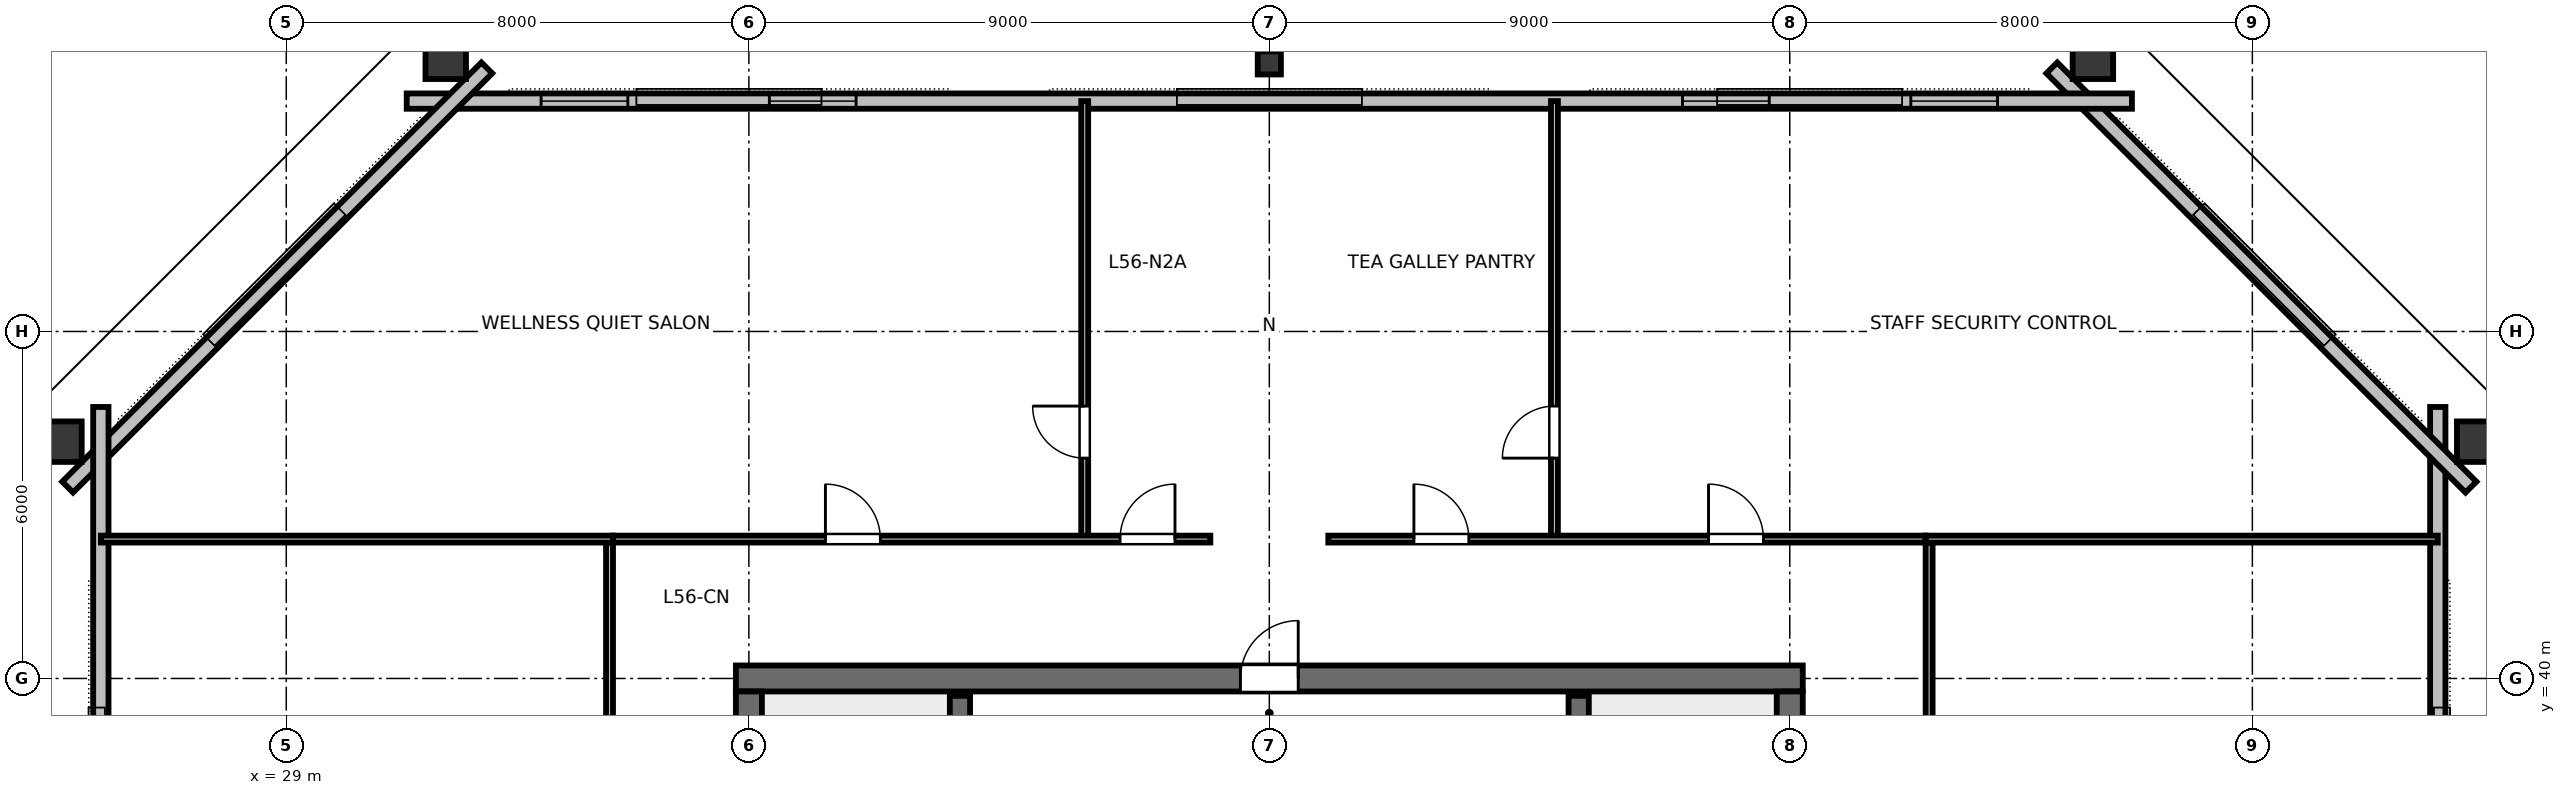
"""IFC4 building model, lengths in metres.
Left out: names, types, materials, properties, quantities, classifications, styles, units other than length and angle.
Written with IfcOpenShell. Run it as: python <this file> out.ifc"""

import sys

from ifc_helpers import new_model, si_unit, direction, frame, frame_2d, origin, origin_2d, place, context, subcontext, project, spatial, rectangle, hollow_rectangle, i_section, extrude, element, fill, save


model = new_model("IFC4")
c1 = context("Model", 3, precision=1e-05, world=origin(), true_north=direction((0.0, 1.0)))
c2 = subcontext(c1, "Body", "Model", "MODEL_VIEW")
j1 = project(units=[si_unit("LENGTHUNIT", "METRE"), si_unit("PLANEANGLEUNIT", "RADIAN")], contexts=[c1])
p1 = place(None, origin())
s1 = spatial("IfcSite", under=j1, at=p1, CompositionType="ELEMENT")
p2 = place(p1, origin())
s2 = spatial("IfcBuilding", under=s1, at=p2, CompositionType="ELEMENT")
p3 = place(p2, frame((0.0, 0.0, 213.0)))
s3 = spatial("IfcBuildingStorey", under=s2, at=p3, CompositionType="ELEMENT", Elevation=213.0)
p4 = place(p3, frame((36.775, 40.0, 0.0), z_axis=(0.0, 0.0, 1.0), x_axis=(1.0, 0.0, 0.0)))
e1 = element("IfcWall", 1, at=p4, inside=s3, PredefinedType="SHEAR", context=c2, shape_type="SweptSolid", body=[
    extrude(rectangle(XDim=18.45, YDim=0.45, at=frame_2d((9.225, 0.0))), origin(), (0.0, 0.0, 1.0), 3.36),
])
p5 = place(p4, frame((8.725, 0.0, 0.0)))
e2 = element("IfcOpeningElement", 2, at=p5, cuts=e1, PredefinedType="OPENING", context=c2, shape_type="SweptSolid", body=[
    extrude(rectangle(XDim=1.0, YDim=2.15, at=frame_2d((0.5, 1.075))), frame((0.0, 0.235, 0.0), z_axis=(0.0, -1.0, 0.0), x_axis=(1.0, 0.0, 0.0)), (0.0, 0.0, 1.0), 0.47),
])
p6 = place(p3, frame((37.0, 24.225, 0.0), z_axis=(0.0, 0.0, 1.0), x_axis=(0.0, 1.0, 0.0)))
e3 = element("IfcWall", 3, at=p6, inside=s3, PredefinedType="SHEAR", context=c2, shape_type="SweptSolid", body=[
    extrude(rectangle(XDim=15.55, YDim=0.45, at=frame_2d((7.775, 0.0))), origin(), (0.0, 0.0, 1.0), 3.36),
])
p7 = place(p6, frame((5.3, 0.0, 0.0)))
e4 = element("IfcOpeningElement", 4, at=p7, cuts=e3, PredefinedType="OPENING", context=c2, shape_type="SweptSolid", body=[
    extrude(rectangle(XDim=1.15, YDim=2.15, at=frame_2d((0.575, 1.075))), frame((0.0, 0.235, 0.0), z_axis=(0.0, -1.0, 0.0), x_axis=(1.0, 0.0, 0.0)), (0.0, 0.0, 1.0), 0.47),
])
p8 = place(p3, frame((55.0, 24.225, 0.0), z_axis=(0.0, 0.0, 1.0), x_axis=(0.0, 1.0, 0.0)))
e5 = element("IfcWall", 5, at=p8, inside=s3, PredefinedType="SHEAR", context=c2, shape_type="SweptSolid", body=[
    extrude(rectangle(XDim=15.55, YDim=0.45, at=frame_2d((7.775, 0.0))), origin(), (0.0, 0.0, 1.0), 3.36),
])
p9 = place(p8, frame((5.3, 0.0, 0.0)))
e6 = element("IfcOpeningElement", 6, at=p9, cuts=e5, PredefinedType="OPENING", context=c2, shape_type="SweptSolid", body=[
    extrude(rectangle(XDim=1.15, YDim=2.15, at=frame_2d((0.575, 1.075))), frame((0.0, 0.235, 0.0), z_axis=(0.0, -1.0, 0.0), x_axis=(1.0, 0.0, 0.0)), (0.0, 0.0, 1.0), 0.47),
])
for number, where, z_axis, x_axis in (
    (7, (66.963, 44.095, 0.0), (0.0, 0.0, 1.0), (0.0, 1.0, 0.0)),
    (8, (60.242, 50.79, 0.0), (0.0, 0.0, 1.0), (1.0, 0.0, 0.0)),
):
    element("IfcColumn", number, at=place(p3, frame(where, z_axis=z_axis, x_axis=x_axis)), inside=s3, PredefinedType="COLUMN", context=c2, shape_type="SweptSolid", body=[
        extrude(hollow_rectangle(XDim=0.7, YDim=0.85, WallThickness=0.04, at=origin_2d()), origin(), (0.0, 0.0, 1.0), 3.373),
    ])
p10 = place(p3, frame((46.0, 50.644, 0.0), z_axis=(0.0, 0.0, 1.0), x_axis=(1.0, 0.0, 0.0)))
e9 = element("IfcColumn", 9, at=p10, inside=s3, PredefinedType="COLUMN", context=c2, shape_type="SweptSolid", body=[
    extrude(i_section(OverallWidth=0.401, OverallDepth=0.399, WebThickness=0.025, FlangeThickness=0.04, FilletRadius=0.025, at=origin_2d()), origin(), (0.0, 0.0, 1.0), 3.373),
])
for number, where, z_axis, x_axis in (
    (10, (31.758, 50.79, 0.0), (0.0, 0.0, 1.0), (1.0, 0.0, 0.0)),
    (11, (25.037, 44.095, 0.0), (0.0, 0.0, 1.0), (0.0, 1.0, 0.0)),
):
    element("IfcColumn", number, at=place(p3, frame(where, z_axis=z_axis, x_axis=x_axis)), inside=s3, PredefinedType="COLUMN", context=c2, shape_type="SweptSolid", body=[
        extrude(hollow_rectangle(XDim=0.7, YDim=0.85, WallThickness=0.04, at=origin_2d()), origin(), (0.0, 0.0, 1.0), 3.373),
    ])
p11 = place(p3, frame((66.206, 19.305, 0.0), z_axis=(0.0, 0.0, 1.0), x_axis=(0.0, 1.0, 0.0)))
e12 = element("IfcWall", 12, at=p11, inside=s3, PredefinedType="STANDARD", context=c2, shape_type="SweptSolid", body=[
    extrude(rectangle(XDim=25.389, YDim=0.265, at=frame_2d((12.695, 0.0))), origin(), (0.0, 0.0, 1.0), 3.375),
])
p12 = place(p11, frame((6.147, 0.0, 0.85)))
e13 = element("IfcOpeningElement", 13, at=p12, cuts=e12, PredefinedType="OPENING", context=c2, shape_type="SweptSolid", body=[
    extrude(rectangle(XDim=1.5, YDim=1.85, at=frame_2d((0.75, 0.925))), frame((0.0, 0.142, 0.0), z_axis=(0.0, -1.0, 0.0), x_axis=(1.0, 0.0, 0.0)), (0.0, 0.0, 1.0), 0.285),
])
p13 = place(p11, frame((17.742, 0.0, 0.85)))
e14 = element("IfcOpeningElement", 14, at=p13, cuts=e12, PredefinedType="OPENING", context=c2, shape_type="SweptSolid", body=[
    extrude(rectangle(XDim=1.5, YDim=1.85, at=frame_2d((0.75, 0.925))), frame((0.0, 0.142, 0.0), z_axis=(0.0, -1.0, 0.0), x_axis=(1.0, 0.0, 0.0)), (0.0, 0.0, 1.0), 0.285),
])
p14 = place(p3, frame((66.78, 43.309, 0.0), z_axis=(0.0, 0.0, 1.0), x_axis=(-0.707106781187, 0.707106781187, 0.0)))
e15 = element("IfcWall", 15, at=p14, inside=s3, PredefinedType="STANDARD", context=c2, shape_type="SweptSolid", body=[
    extrude(rectangle(XDim=10.251, YDim=0.265, at=frame_2d((5.125, 0.0))), origin(), (0.0, 0.0, 1.0), 3.375),
])
p15 = place(p3, frame((60.917, 49.984, 0.0), z_axis=(0.0, 0.0, 1.0), x_axis=(-1.0, 0.0, 0.0)))
e16 = element("IfcWall", 16, at=p15, inside=s3, PredefinedType="STANDARD", context=c2, shape_type="SweptSolid", body=[
    extrude(rectangle(XDim=29.834, YDim=0.265, at=frame_2d((14.917, 0.0))), origin(), (0.0, 0.0, 1.0), 3.375),
])
p16 = place(p15, frame((2.324, 0.0, 0.85)))
e17 = element("IfcOpeningElement", 17, at=p16, cuts=e16, PredefinedType="OPENING", context=c2, shape_type="SweptSolid", body=[
    extrude(rectangle(XDim=1.5, YDim=1.85, at=frame_2d((0.75, 0.925))), frame((0.0, 0.142, 0.0), z_axis=(0.0, -1.0, 0.0), x_axis=(1.0, 0.0, 0.0)), (0.0, 0.0, 1.0), 0.285),
])
p17 = place(p15, frame((6.272, 0.0, 0.85)))
e18 = element("IfcOpeningElement", 18, at=p17, cuts=e16, PredefinedType="OPENING", context=c2, shape_type="SweptSolid", body=[
    extrude(rectangle(XDim=1.5, YDim=1.85, at=frame_2d((0.75, 0.925))), frame((0.0, 0.142, 0.0), z_axis=(0.0, -1.0, 0.0), x_axis=(1.0, 0.0, 0.0)), (0.0, 0.0, 1.0), 0.285),
])
p18 = place(p15, frame((22.063, 0.0, 0.85)))
e19 = element("IfcOpeningElement", 19, at=p18, cuts=e16, PredefinedType="OPENING", context=c2, shape_type="SweptSolid", body=[
    extrude(rectangle(XDim=1.5, YDim=1.85, at=frame_2d((0.75, 0.925))), frame((0.0, 0.142, 0.0), z_axis=(0.0, -1.0, 0.0), x_axis=(1.0, 0.0, 0.0)), (0.0, 0.0, 1.0), 0.285),
])
p19 = place(p15, frame((26.011, 0.0, 0.85)))
e20 = element("IfcOpeningElement", 20, at=p19, cuts=e16, PredefinedType="OPENING", context=c2, shape_type="SweptSolid", body=[
    extrude(rectangle(XDim=1.5, YDim=1.85, at=frame_2d((0.75, 0.925))), frame((0.0, 0.142, 0.0), z_axis=(0.0, -1.0, 0.0), x_axis=(1.0, 0.0, 0.0)), (0.0, 0.0, 1.0), 0.285),
])
p20 = place(p3, frame((32.468, 50.558, 0.0), z_axis=(0.0, 0.0, 1.0), x_axis=(-0.707106781187, -0.707106781187, 0.0)))
e21 = element("IfcWall", 21, at=p20, inside=s3, PredefinedType="STANDARD", context=c2, shape_type="SweptSolid", body=[
    extrude(rectangle(XDim=10.251, YDim=0.265, at=frame_2d((5.125, 0.0))), origin(), (0.0, 0.0, 1.0), 3.375),
])
p21 = place(p3, frame((25.794, 44.695, 0.0), z_axis=(0.0, 0.0, 1.0), x_axis=(0.0, -1.0, 0.0)))
e22 = element("IfcWall", 22, at=p21, inside=s3, PredefinedType="STANDARD", context=c2, shape_type="SweptSolid", body=[
    extrude(rectangle(XDim=25.389, YDim=0.265, at=frame_2d((12.695, 0.0))), origin(), (0.0, 0.0, 1.0), 3.375),
])
p22 = place(p21, frame((6.147, 0.0, 0.85)))
e23 = element("IfcOpeningElement", 23, at=p22, cuts=e22, PredefinedType="OPENING", context=c2, shape_type="SweptSolid", body=[
    extrude(rectangle(XDim=1.5, YDim=1.85, at=frame_2d((0.75, 0.925))), frame((0.0, 0.142, 0.0), z_axis=(0.0, -1.0, 0.0), x_axis=(1.0, 0.0, 0.0)), (0.0, 0.0, 1.0), 0.285),
])
p23 = place(p21, frame((10.012, 0.0, 0.85)))
e24 = element("IfcOpeningElement", 24, at=p23, cuts=e22, PredefinedType="OPENING", context=c2, shape_type="SweptSolid", body=[
    extrude(rectangle(XDim=1.5, YDim=1.85, at=frame_2d((0.75, 0.925))), frame((0.0, 0.142, 0.0), z_axis=(0.0, -1.0, 0.0), x_axis=(1.0, 0.0, 0.0)), (0.0, 0.0, 1.0), 0.285),
])
p24 = place(p21, frame((13.877, 0.0, 0.85)))
e25 = element("IfcOpeningElement", 25, at=p24, cuts=e22, PredefinedType="OPENING", context=c2, shape_type="SweptSolid", body=[
    extrude(rectangle(XDim=1.5, YDim=1.85, at=frame_2d((0.75, 0.925))), frame((0.0, 0.142, 0.0), z_axis=(0.0, -1.0, 0.0), x_axis=(1.0, 0.0, 0.0)), (0.0, 0.0, 1.0), 0.285),
])
p25 = place(p21, frame((17.742, 0.0, 0.85)))
e26 = element("IfcOpeningElement", 26, at=p25, cuts=e22, PredefinedType="OPENING", context=c2, shape_type="SweptSolid", body=[
    extrude(rectangle(XDim=1.5, YDim=1.85, at=frame_2d((0.75, 0.925))), frame((0.0, 0.142, 0.0), z_axis=(0.0, -1.0, 0.0), x_axis=(1.0, 0.0, 0.0)), (0.0, 0.0, 1.0), 0.285),
])
for number, where, z_axis, x_axis in (
    (27, (40.65, 32.0, 0.0), (0.0, 0.0, 1.0), (0.0, 1.0, 0.0)),
    (28, (51.35, 32.0, 0.0), (0.0, 0.0, 1.0), (0.0, 1.0, 0.0)),
):
    element("IfcWall", number, at=place(p3, frame(where, z_axis=z_axis, x_axis=x_axis)), inside=s3, PredefinedType="SHEAR", context=c2, shape_type="SweptSolid", body=[
        extrude(rectangle(XDim=7.7, YDim=0.35, at=frame_2d((3.85, 0.0))), origin(), (0.0, 0.0, 1.0), 3.6),
    ])
p26 = place(p3, frame((42.807, 42.41, 0.0), z_axis=(0.0, 0.0, 1.0), x_axis=(0.0, 1.0, 0.0)))
e29 = element("IfcWall", 29, at=p26, inside=s3, PredefinedType="PARTITIONING", context=c2, shape_type="SweptSolid", body=[
    extrude(rectangle(XDim=7.574, YDim=0.12, at=frame_2d((3.787, 0.0))), origin(), (0.0, 0.0, 1.0), 2.655),
])
p27 = place(p26, frame((1.4, 0.0, 0.0)))
e30 = element("IfcOpeningElement", 30, at=p27, cuts=e29, PredefinedType="OPENING", context=c2, shape_type="SweptSolid", body=[
    extrude(rectangle(XDim=0.9, YDim=2.15, at=frame_2d((0.45, 1.075))), frame((0.0, 0.07, 0.0), z_axis=(0.0, -1.0, 0.0), x_axis=(1.0, 0.0, 0.0)), (0.0, 0.0, 1.0), 0.14),
])
p28 = place(p3, frame((50.93, 42.41, 0.0), z_axis=(0.0, 0.0, 1.0), x_axis=(0.0, 1.0, 0.0)))
e31 = element("IfcWall", 31, at=p28, inside=s3, PredefinedType="PARTITIONING", context=c2, shape_type="SweptSolid", body=[
    extrude(rectangle(XDim=7.574, YDim=0.12, at=frame_2d((3.787, 0.0))), origin(), (0.0, 0.0, 1.0), 2.655),
])
p29 = place(p28, frame((1.4, 0.0, 0.0)))
e32 = element("IfcOpeningElement", 32, at=p29, cuts=e31, PredefinedType="OPENING", context=c2, shape_type="SweptSolid", body=[
    extrude(rectangle(XDim=0.9, YDim=2.15, at=frame_2d((0.45, 1.075))), frame((0.0, 0.07, 0.0), z_axis=(0.0, -1.0, 0.0), x_axis=(1.0, 0.0, 0.0)), (0.0, 0.0, 1.0), 0.14),
])
p30 = place(p3, frame((34.65, 42.41, 0.0), z_axis=(0.0, 0.0, 1.0), x_axis=(1.0, 0.0, 0.0)))
e33 = element("IfcWall", 33, at=p30, inside=s3, PredefinedType="PARTITIONING", context=c2, shape_type="SweptSolid", body=[
    extrude(rectangle(XDim=10.33, YDim=0.12, at=frame_2d((5.165, 0.0))), origin(), (0.0, 0.0, 1.0), 2.655),
])
p31 = place(p30, frame((3.674, 0.0, 0.0)))
e34 = element("IfcOpeningElement", 34, at=p31, cuts=e33, PredefinedType="OPENING", context=c2, shape_type="SweptSolid", body=[
    extrude(rectangle(XDim=0.95, YDim=2.15, at=frame_2d((0.475, 1.075))), frame((0.0, 0.07, 0.0), z_axis=(0.0, -1.0, 0.0), x_axis=(1.0, 0.0, 0.0)), (0.0, 0.0, 1.0), 0.14),
])
p32 = place(p30, frame((8.769, 0.0, 0.0)))
e35 = element("IfcOpeningElement", 35, at=p32, cuts=e33, PredefinedType="OPENING", context=c2, shape_type="SweptSolid", body=[
    extrude(rectangle(XDim=0.95, YDim=2.15, at=frame_2d((0.475, 1.075))), frame((0.0, 0.07, 0.0), z_axis=(0.0, -1.0, 0.0), x_axis=(1.0, 0.0, 0.0)), (0.0, 0.0, 1.0), 0.14),
])
p33 = place(p3, frame((47.02, 42.41, 0.0), z_axis=(0.0, 0.0, 1.0), x_axis=(1.0, 0.0, 0.0)))
e36 = element("IfcWall", 36, at=p33, inside=s3, PredefinedType="PARTITIONING", context=c2, shape_type="SweptSolid", body=[
    extrude(rectangle(XDim=10.33, YDim=0.12, at=frame_2d((5.165, 0.0))), origin(), (0.0, 0.0, 1.0), 2.655),
])
p34 = place(p33, frame((1.48, 0.0, 0.0)))
e37 = element("IfcOpeningElement", 37, at=p34, cuts=e36, PredefinedType="OPENING", context=c2, shape_type="SweptSolid", body=[
    extrude(rectangle(XDim=0.95, YDim=2.15, at=frame_2d((0.475, 1.075))), frame((0.0, 0.07, 0.0), z_axis=(0.0, -1.0, 0.0), x_axis=(1.0, 0.0, 0.0)), (0.0, 0.0, 1.0), 0.14),
])
p35 = place(p33, frame((6.575, 0.0, 0.0)))
e38 = element("IfcOpeningElement", 38, at=p35, cuts=e36, PredefinedType="OPENING", context=c2, shape_type="SweptSolid", body=[
    extrude(rectangle(XDim=0.95, YDim=2.15, at=frame_2d((0.475, 1.075))), frame((0.0, 0.07, 0.0), z_axis=(0.0, -1.0, 0.0), x_axis=(1.0, 0.0, 0.0)), (0.0, 0.0, 1.0), 0.14),
])
p36 = place(p3, frame((34.59, 21.65, 0.0), z_axis=(0.0, 0.0, 1.0), x_axis=(0.0, 1.0, 0.0)))
e39 = element("IfcWall", 39, at=p36, inside=s3, PredefinedType="PARTITIONING", context=c2, shape_type="SweptSolid", body=[
    extrude(rectangle(XDim=20.7, YDim=0.12, at=frame_2d((10.35, 0.0))), origin(), (0.0, 0.0, 1.0), 2.655),
])
p37 = place(p36, frame((9.875, 0.0, 0.0)))
e40 = element("IfcOpeningElement", 40, at=p37, cuts=e39, PredefinedType="OPENING", context=c2, shape_type="SweptSolid", body=[
    extrude(rectangle(XDim=0.95, YDim=2.15, at=frame_2d((0.475, 1.075))), frame((0.0, 0.07, 0.0), z_axis=(0.0, -1.0, 0.0), x_axis=(1.0, 0.0, 0.0)), (0.0, 0.0, 1.0), 0.14),
])
p38 = place(p3, frame((57.41, 21.65, 0.0), z_axis=(0.0, 0.0, 1.0), x_axis=(0.0, 1.0, 0.0)))
e41 = element("IfcWall", 41, at=p38, inside=s3, PredefinedType="PARTITIONING", context=c2, shape_type="SweptSolid", body=[
    extrude(rectangle(XDim=20.7, YDim=0.12, at=frame_2d((10.35, 0.0))), origin(), (0.0, 0.0, 1.0), 2.655),
])
p39 = place(p38, frame((3.546, 0.0, 0.0)))
e42 = element("IfcOpeningElement", 42, at=p39, cuts=e41, PredefinedType="OPENING", context=c2, shape_type="SweptSolid", body=[
    extrude(rectangle(XDim=0.95, YDim=2.15, at=frame_2d((0.475, 1.075))), frame((0.0, 0.07, 0.0), z_axis=(0.0, -1.0, 0.0), x_axis=(1.0, 0.0, 0.0)), (0.0, 0.0, 1.0), 0.14),
])
p40 = place(p38, frame((10.054, 0.0, 0.0)))
e43 = element("IfcOpeningElement", 43, at=p40, cuts=e41, PredefinedType="OPENING", context=c2, shape_type="SweptSolid", body=[
    extrude(rectangle(XDim=0.95, YDim=2.15, at=frame_2d((0.475, 1.075))), frame((0.0, 0.07, 0.0), z_axis=(0.0, -1.0, 0.0), x_axis=(1.0, 0.0, 0.0)), (0.0, 0.0, 1.0), 0.14),
])
p41 = place(p38, frame((16.384, 0.0, 0.0)))
e44 = element("IfcOpeningElement", 44, at=p41, cuts=e41, PredefinedType="OPENING", context=c2, shape_type="SweptSolid", body=[
    extrude(rectangle(XDim=0.95, YDim=2.15, at=frame_2d((0.475, 1.075))), frame((0.0, 0.07, 0.0), z_axis=(0.0, -1.0, 0.0), x_axis=(1.0, 0.0, 0.0)), (0.0, 0.0, 1.0), 0.14),
])
for number, where, z_axis, x_axis in (
    (45, (34.65, 42.41, 0.0), (0.0, 0.0, 1.0), (-1.0, 0.0, 0.0)),
    (46, (57.35, 42.41, 0.0), (0.0, 0.0, 1.0), (1.0, 0.0, 0.0)),
):
    element("IfcWall", number, at=place(p3, frame(where, z_axis=z_axis, x_axis=x_axis)), inside=s3, PredefinedType="PARTITIONING", context=c2, shape_type="SweptSolid", body=[
        extrude(rectangle(XDim=8.856, YDim=0.12, at=frame_2d((4.428, 0.0))), origin(), (0.0, 0.0, 1.0), 2.655),
    ])
p42 = place(p16, origin())
e47 = element("IfcWindow", 47, at=p42, inside=s3, PartitioningType="SINGLE_PANEL", PredefinedType="WINDOW", context=c2, shape_type="SweptSolid", body=[
    extrude(rectangle(XDim=1.5, YDim=1.85, at=frame_2d((0.75, 0.925))), frame((0.0, 0.03, 0.0), z_axis=(0.0, -1.0, 0.0), x_axis=(1.0, 0.0, 0.0)), (0.0, 0.0, 1.0), 0.06),
])
fill(e17, e47)
p43 = place(p17, origin())
e48 = element("IfcWindow", 48, at=p43, inside=s3, PartitioningType="SINGLE_PANEL", PredefinedType="WINDOW", context=c2, shape_type="SweptSolid", body=[
    extrude(rectangle(XDim=1.5, YDim=1.85, at=frame_2d((0.75, 0.925))), frame((0.0, 0.03, 0.0), z_axis=(0.0, -1.0, 0.0), x_axis=(1.0, 0.0, 0.0)), (0.0, 0.0, 1.0), 0.06),
])
fill(e18, e48)
p44 = place(p18, origin())
e49 = element("IfcWindow", 49, at=p44, inside=s3, PartitioningType="SINGLE_PANEL", PredefinedType="WINDOW", context=c2, shape_type="SweptSolid", body=[
    extrude(rectangle(XDim=1.5, YDim=1.85, at=frame_2d((0.75, 0.925))), frame((0.0, 0.03, 0.0), z_axis=(0.0, -1.0, 0.0), x_axis=(1.0, 0.0, 0.0)), (0.0, 0.0, 1.0), 0.06),
])
fill(e19, e49)
p45 = place(p19, origin())
e50 = element("IfcWindow", 50, at=p45, inside=s3, PartitioningType="SINGLE_PANEL", PredefinedType="WINDOW", context=c2, shape_type="SweptSolid", body=[
    extrude(rectangle(XDim=1.5, YDim=1.85, at=frame_2d((0.75, 0.925))), frame((0.0, 0.03, 0.0), z_axis=(0.0, -1.0, 0.0), x_axis=(1.0, 0.0, 0.0)), (0.0, 0.0, 1.0), 0.06),
])
fill(e20, e50)
p46 = place(p5, origin())
e51 = element("IfcDoor", 51, at=p46, inside=s3, OperationType="SINGLE_SWING_RIGHT", PredefinedType="DOOR", context=c2, shape_type="SweptSolid", body=[
    extrude(rectangle(XDim=1.0, YDim=2.15, at=frame_2d((0.5, 1.075))), frame((0.0, 0.025, 0.0), z_axis=(0.0, -1.0, 0.0), x_axis=(1.0, 0.0, 0.0)), (0.0, 0.0, 1.0), 0.05),
])
fill(e2, e51)
p47 = place(p27, origin())
e52 = element("IfcDoor", 52, at=p47, inside=s3, OperationType="SINGLE_SWING_RIGHT", PredefinedType="DOOR", context=c2, shape_type="SweptSolid", body=[
    extrude(rectangle(XDim=0.9, YDim=2.15, at=frame_2d((0.45, 1.075))), frame((0.0, 0.025, 0.0), z_axis=(0.0, -1.0, 0.0), x_axis=(1.0, 0.0, 0.0)), (0.0, 0.0, 1.0), 0.05),
])
fill(e30, e52)
p48 = place(p29, origin())
e53 = element("IfcDoor", 53, at=p48, inside=s3, OperationType="SINGLE_SWING_LEFT", PredefinedType="DOOR", context=c2, shape_type="SweptSolid", body=[
    extrude(rectangle(XDim=0.9, YDim=2.15, at=frame_2d((0.45, 1.075))), frame((0.0, 0.025, 0.0), z_axis=(0.0, -1.0, 0.0), x_axis=(1.0, 0.0, 0.0)), (0.0, 0.0, 1.0), 0.05),
])
fill(e32, e53)
p49 = place(p31, origin())
e54 = element("IfcDoor", 54, at=p49, inside=s3, OperationType="SINGLE_SWING_LEFT", PredefinedType="DOOR", context=c2, shape_type="SweptSolid", body=[
    extrude(rectangle(XDim=0.95, YDim=2.15, at=frame_2d((0.475, 1.075))), frame((0.0, 0.025, 0.0), z_axis=(0.0, -1.0, 0.0), x_axis=(1.0, 0.0, 0.0)), (0.0, 0.0, 1.0), 0.05),
])
fill(e34, e54)
p50 = place(p32, origin())
e55 = element("IfcDoor", 55, at=p50, inside=s3, OperationType="SINGLE_SWING_RIGHT", PredefinedType="DOOR", context=c2, shape_type="SweptSolid", body=[
    extrude(rectangle(XDim=0.95, YDim=2.15, at=frame_2d((0.475, 1.075))), frame((0.0, 0.025, 0.0), z_axis=(0.0, -1.0, 0.0), x_axis=(1.0, 0.0, 0.0)), (0.0, 0.0, 1.0), 0.05),
])
fill(e35, e55)
p51 = place(p34, origin())
e56 = element("IfcDoor", 56, at=p51, inside=s3, OperationType="SINGLE_SWING_LEFT", PredefinedType="DOOR", context=c2, shape_type="SweptSolid", body=[
    extrude(rectangle(XDim=0.95, YDim=2.15, at=frame_2d((0.475, 1.075))), frame((0.0, 0.025, 0.0), z_axis=(0.0, -1.0, 0.0), x_axis=(1.0, 0.0, 0.0)), (0.0, 0.0, 1.0), 0.05),
])
fill(e37, e56)
p52 = place(p35, origin())
e57 = element("IfcDoor", 57, at=p52, inside=s3, OperationType="SINGLE_SWING_LEFT", PredefinedType="DOOR", context=c2, shape_type="SweptSolid", body=[
    extrude(rectangle(XDim=0.95, YDim=2.15, at=frame_2d((0.475, 1.075))), frame((0.0, 0.025, 0.0), z_axis=(0.0, -1.0, 0.0), x_axis=(1.0, 0.0, 0.0)), (0.0, 0.0, 1.0), 0.05),
])
fill(e38, e57)
save(model, sys.argv[1])
